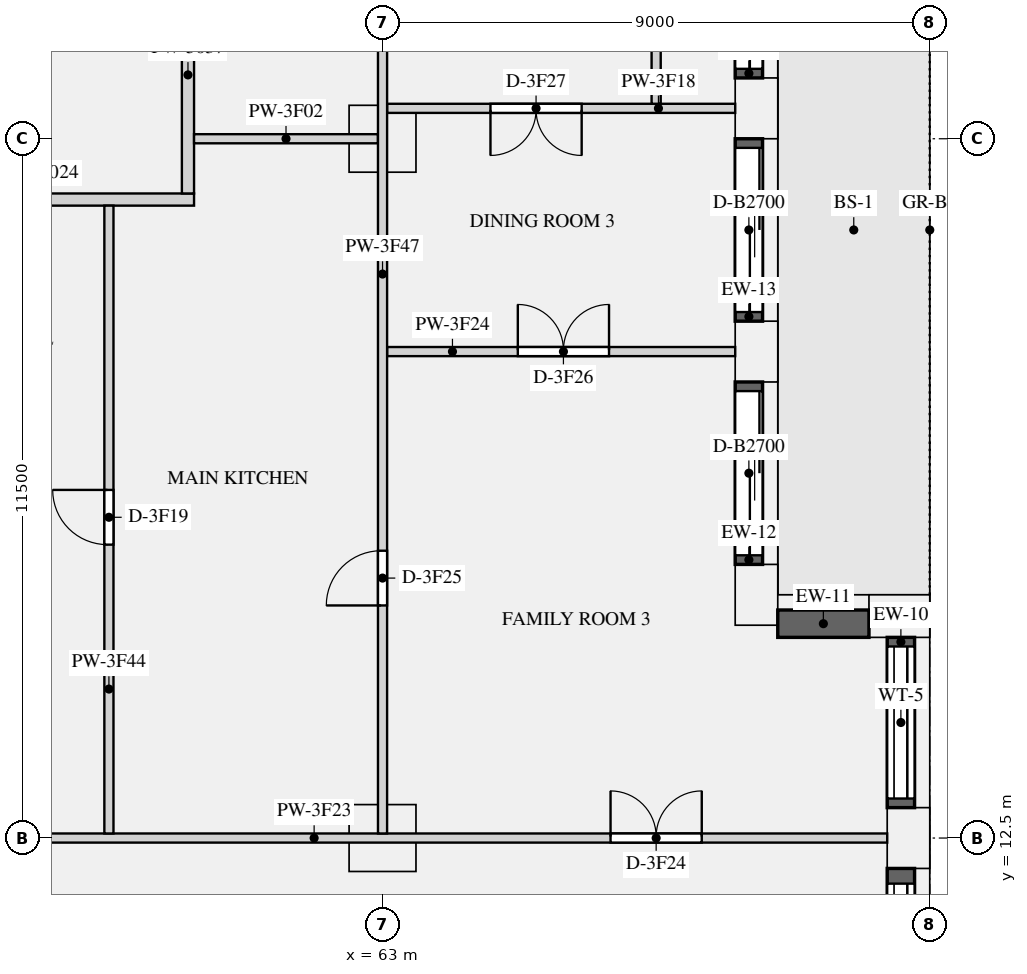
"""IFC4 building model, lengths in metres.
Left out: names, types, materials, properties, quantities, classifications, styles, units other than length and angle.
Written with IfcOpenShell. Run it as: python <this file> out.ifc"""

import sys

from ifc_helpers import new_model, si_unit, direction, frame, frame_2d, origin, origin_2d, place, context, subcontext, project, spatial, rectangle, extrude, element, fill, save


model = new_model("IFC4")
c1 = context("Model", 3, precision=1e-05, world=origin(), true_north=direction((0.0, 1.0)))
c2 = subcontext(c1, "Body", "Model", "MODEL_VIEW")
j1 = project(units=[si_unit("LENGTHUNIT", "METRE"), si_unit("PLANEANGLEUNIT", "RADIAN")], contexts=[c1])
p1 = place(None, origin())
s1 = spatial("IfcSite", under=j1, at=p1, CompositionType="ELEMENT")
p2 = place(p1, origin())
s2 = spatial("IfcBuilding", under=s1, at=p2, CompositionType="ELEMENT")
p3 = place(p2, frame((0.0, 0.0, 182.25)))
s3 = spatial("IfcBuildingStorey", under=s2, at=p3, CompositionType="ELEMENT", Elevation=182.25)
for number, where, z_axis, x_axis in (
    (1, (71.65, 12.5, 0.0), (0.0, 0.0, 1.0), (0.0, 1.0, 0.0)),
    (2, (71.5, 16.15, 0.0), (0.0, 0.0, 1.0), (-1.0, 0.0, 0.0)),
    (3, (69.15, 16.5, 0.0), (0.0, 0.0, 1.0), (0.0, 1.0, 0.0)),
    (4, (69.15, 20.5, 0.0), (0.0, 0.0, 1.0), (0.0, 1.0, 0.0)),
    (5, (69.15, 24.5, 0.0), (0.0, 0.0, 1.0), (0.0, 1.0, 0.0)),
):
    element("IfcColumn", number, at=place(p3, frame(where, z_axis=z_axis, x_axis=x_axis)), inside=s3, PredefinedType="USERDEFINED", context=c2, shape_type="SweptSolid", body=[
        extrude(rectangle(XDim=1.0, YDim=0.7, at=origin_2d()), origin(), (0.0, 0.0, 1.0), 3.15),
    ])
for number, where, z_axis, x_axis in (
    (6, (63.0, 24.0, 0.0), (0.0, 0.0, 1.0), (1.0, 0.0, 0.0)),
    (7, (63.0, 12.5, 0.0), (0.0, 0.0, 1.0), (1.0, 0.0, 0.0)),
):
    element("IfcColumn", number, at=place(p3, frame(where, z_axis=z_axis, x_axis=x_axis)), inside=s3, PredefinedType="COLUMN", context=c2, shape_type="SweptSolid", body=[
        extrude(rectangle(XDim=1.1, YDim=1.1, at=origin_2d()), origin(), (0.0, 0.0, 1.0), 3.15),
    ])
p4 = place(p3, frame((71.525, 9.0, 0.9), z_axis=(0.0, 0.0, 1.0), x_axis=(0.0, 1.0, 0.0)))
e8 = element("IfcWall", 8, at=p4, inside=s3, PredefinedType="SOLIDWALL", context=c2, shape_type="SweptSolid", body=[
    extrude(rectangle(XDim=3.0, YDim=0.45, at=frame_2d((1.5, 0.0))), origin(), (0.0, 0.0, 1.0), 1.75),
])
p5 = place(p4, frame((0.25, 0.0, 0.15)))
e9 = element("IfcOpeningElement", 9, at=p5, cuts=e8, PredefinedType="OPENING", context=c2, shape_type="SweptSolid", body=[
    extrude(rectangle(XDim=2.5, YDim=1.5, at=frame_2d((1.25, 0.75))), frame((0.0, 0.235, 0.0), z_axis=(0.0, -1.0, 0.0), x_axis=(1.0, 0.0, 0.0)), (0.0, 0.0, 1.0), 0.47),
])
p6 = place(p3, frame((71.525, 13.0, 0.9), z_axis=(0.0, 0.0, 1.0), x_axis=(0.0, 1.0, 0.0)))
e10 = element("IfcWall", 10, at=p6, inside=s3, PredefinedType="SOLIDWALL", context=c2, shape_type="SweptSolid", body=[
    extrude(rectangle(XDim=2.8, YDim=0.45, at=frame_2d((1.4, 0.0))), origin(), (0.0, 0.0, 1.0), 1.75),
])
p7 = place(p6, frame((0.15, 0.0, 0.15)))
e11 = element("IfcOpeningElement", 11, at=p7, cuts=e10, PredefinedType="OPENING", context=c2, shape_type="SweptSolid", body=[
    extrude(rectangle(XDim=2.5, YDim=1.5, at=frame_2d((1.25, 0.75))), frame((0.0, 0.235, 0.0), z_axis=(0.0, -1.0, 0.0), x_axis=(1.0, 0.0, 0.0)), (0.0, 0.0, 1.0), 0.47),
])
p8 = place(p3, frame((71.0, 16.025, 0.9), z_axis=(0.0, 0.0, 1.0), x_axis=(-1.0, 0.0, 0.0)))
e12 = element("IfcWall", 12, at=p8, inside=s3, PredefinedType="SOLIDWALL", context=c2, shape_type="SweptSolid", body=[
    extrude(rectangle(XDim=1.5, YDim=0.45, at=frame_2d((0.75, 0.0))), origin(), (0.0, 0.0, 1.0), 1.75),
])
p9 = place(p3, frame((69.025, 17.0, 0.0), z_axis=(0.0, 0.0, 1.0), x_axis=(0.0, 1.0, 0.0)))
e13 = element("IfcWall", 13, at=p9, inside=s3, PredefinedType="SOLIDWALL", context=c2, shape_type="SweptSolid", body=[
    extrude(rectangle(XDim=3.0, YDim=0.45, at=frame_2d((1.5, 0.0))), origin(), (0.0, 0.0, 1.0), 2.65),
])
p10 = place(p9, frame((0.15, 0.0, 0.0)))
e14 = element("IfcOpeningElement", 14, at=p10, cuts=e13, PredefinedType="OPENING", context=c2, shape_type="SweptSolid", body=[
    extrude(rectangle(XDim=2.7, YDim=2.3, at=frame_2d((1.35, 1.15))), frame((0.0, 0.235, 0.0), z_axis=(0.0, -1.0, 0.0), x_axis=(1.0, 0.0, 0.0)), (0.0, 0.0, 1.0), 0.47),
])
p11 = place(p3, frame((69.025, 21.0, 0.0), z_axis=(0.0, 0.0, 1.0), x_axis=(0.0, 1.0, 0.0)))
e15 = element("IfcWall", 15, at=p11, inside=s3, PredefinedType="SOLIDWALL", context=c2, shape_type="SweptSolid", body=[
    extrude(rectangle(XDim=3.0, YDim=0.45, at=frame_2d((1.5, 0.0))), origin(), (0.0, 0.0, 1.0), 2.65),
])
p12 = place(p11, frame((0.15, 0.0, 0.0)))
e16 = element("IfcOpeningElement", 16, at=p12, cuts=e15, PredefinedType="OPENING", context=c2, shape_type="SweptSolid", body=[
    extrude(rectangle(XDim=2.7, YDim=2.3, at=frame_2d((1.35, 1.15))), frame((0.0, 0.235, 0.0), z_axis=(0.0, -1.0, 0.0), x_axis=(1.0, 0.0, 0.0)), (0.0, 0.0, 1.0), 0.47),
])
p13 = place(p3, frame((69.025, 25.0, 0.0), z_axis=(0.0, 0.0, 1.0), x_axis=(0.0, 1.0, 0.0)))
e17 = element("IfcWall", 17, at=p13, inside=s3, PredefinedType="SOLIDWALL", context=c2, shape_type="SweptSolid", body=[
    extrude(rectangle(XDim=3.5, YDim=0.45, at=frame_2d((1.75, 0.0))), origin(), (0.0, 0.0, 1.0), 2.65),
])
p14 = place(p13, frame((0.15, 0.0, 0.0)))
e18 = element("IfcOpeningElement", 18, at=p14, cuts=e17, PredefinedType="OPENING", context=c2, shape_type="SweptSolid", body=[
    extrude(rectangle(XDim=3.2, YDim=2.3, at=frame_2d((1.6, 1.15))), frame((0.0, 0.235, 0.0), z_axis=(0.0, -1.0, 0.0), x_axis=(1.0, 0.0, 0.0)), (0.0, 0.0, 1.0), 0.47),
])
p15 = place(p3, frame((54.9, 23.0, 0.0), z_axis=(0.0, 0.0, 1.0), x_axis=(1.0, 0.0, 0.0)))
e19 = element("IfcWall", 19, at=p15, inside=s3, PredefinedType="PARTITIONING", context=c2, shape_type="SweptSolid", body=[
    extrude(rectangle(XDim=5.0, YDim=0.2, at=frame_2d((2.5, 0.0))), origin(), (0.0, 0.0, 1.0), 2.65),
])
p16 = place(p3, frame((59.8, 23.1, 0.0), z_axis=(0.0, 0.0, 1.0), x_axis=(0.0, 1.0, 0.0)))
e20 = element("IfcWall", 20, at=p16, inside=s3, PredefinedType="PARTITIONING", context=c2, shape_type="SweptSolid", body=[
    extrude(rectangle(XDim=3.9, YDim=0.2, at=frame_2d((1.95, 0.0))), origin(), (0.0, 0.0, 1.0), 2.65),
])
p17 = place(p3, frame((59.9, 24.0, 0.0), z_axis=(0.0, 0.0, 1.0), x_axis=(1.0, 0.0, 0.0)))
e21 = element("IfcWall", 21, at=p17, inside=s3, PredefinedType="PARTITIONING", context=c2, shape_type="SweptSolid", body=[
    extrude(rectangle(XDim=3.025, YDim=0.15, at=frame_2d((1.513, 0.0))), origin(), (0.0, 0.0, 1.0), 2.65),
])
p18 = place(p3, frame((63.075, 24.5, 0.0), z_axis=(0.0, 0.0, 1.0), x_axis=(1.0, 0.0, 0.0)))
e22 = element("IfcWall", 22, at=p18, inside=s3, PredefinedType="PARTITIONING", context=c2, shape_type="SweptSolid", body=[
    extrude(rectangle(XDim=5.725, YDim=0.15, at=frame_2d((2.863, 0.0))), origin(), (0.0, 0.0, 1.0), 2.65),
])
p19 = place(p18, frame((1.7, 0.0, 0.0)))
e23 = element("IfcOpeningElement", 23, at=p19, cuts=e22, PredefinedType="OPENING", context=c2, shape_type="SweptSolid", body=[
    extrude(rectangle(XDim=1.5, YDim=2.1, at=frame_2d((0.75, 1.05))), frame((0.0, 0.085, 0.0), z_axis=(0.0, -1.0, 0.0), x_axis=(1.0, 0.0, 0.0)), (0.0, 0.0, 1.0), 0.17),
])
p20 = place(p3, frame((54.0, 12.5, 0.0), z_axis=(0.0, 0.0, 1.0), x_axis=(1.0, 0.0, 0.0)))
e24 = element("IfcWall", 24, at=p20, inside=s3, PredefinedType="PARTITIONING", context=c2, shape_type="SweptSolid", body=[
    extrude(rectangle(XDim=17.3, YDim=0.15, at=frame_2d((8.65, 0.0))), origin(), (0.0, 0.0, 1.0), 2.65),
])
p21 = place(p20, frame((1.5, 0.0, 0.0)))
e25 = element("IfcOpeningElement", 25, at=p21, cuts=e24, PredefinedType="OPENING", context=c2, shape_type="SweptSolid", body=[
    extrude(rectangle(XDim=1.5, YDim=2.1, at=frame_2d((0.75, 1.05))), frame((0.0, 0.085, 0.0), z_axis=(0.0, -1.0, 0.0), x_axis=(1.0, 0.0, 0.0)), (0.0, 0.0, 1.0), 0.17),
])
p22 = place(p20, frame((12.75, 0.0, 0.0)))
e26 = element("IfcOpeningElement", 26, at=p22, cuts=e24, PredefinedType="OPENING", context=c2, shape_type="SweptSolid", body=[
    extrude(rectangle(XDim=1.5, YDim=2.1, at=frame_2d((0.75, 1.05))), frame((0.0, 0.085, 0.0), z_axis=(0.0, -1.0, 0.0), x_axis=(1.0, 0.0, 0.0)), (0.0, 0.0, 1.0), 0.17),
])
p23 = place(p3, frame((63.075, 20.5, 0.0), z_axis=(0.0, 0.0, 1.0), x_axis=(1.0, 0.0, 0.0)))
e27 = element("IfcWall", 27, at=p23, inside=s3, PredefinedType="PARTITIONING", context=c2, shape_type="SweptSolid", body=[
    extrude(rectangle(XDim=5.725, YDim=0.15, at=frame_2d((2.863, 0.0))), origin(), (0.0, 0.0, 1.0), 2.65),
])
p24 = place(p23, frame((2.15, 0.0, 0.0)))
e28 = element("IfcOpeningElement", 28, at=p24, cuts=e27, PredefinedType="OPENING", context=c2, shape_type="SweptSolid", body=[
    extrude(rectangle(XDim=1.5, YDim=2.1, at=frame_2d((0.75, 1.05))), frame((0.0, 0.085, 0.0), z_axis=(0.0, -1.0, 0.0), x_axis=(1.0, 0.0, 0.0)), (0.0, 0.0, 1.0), 0.17),
])
p25 = place(p3, frame((58.5, 12.575, 0.0), z_axis=(0.0, 0.0, 1.0), x_axis=(0.0, 1.0, 0.0)))
e29 = element("IfcWall", 29, at=p25, inside=s3, PredefinedType="PARTITIONING", context=c2, shape_type="SweptSolid", body=[
    extrude(rectangle(XDim=10.325, YDim=0.15, at=frame_2d((5.163, 0.0))), origin(), (0.0, 0.0, 1.0), 2.65),
])
p26 = place(p25, frame((4.75, 0.0, 0.0)))
e30 = element("IfcOpeningElement", 30, at=p26, cuts=e29, PredefinedType="OPENING", context=c2, shape_type="SweptSolid", body=[
    extrude(rectangle(XDim=0.9, YDim=2.1, at=frame_2d((0.45, 1.05))), frame((0.0, 0.085, 0.0), z_axis=(0.0, -1.0, 0.0), x_axis=(1.0, 0.0, 0.0)), (0.0, 0.0, 1.0), 0.17),
])
p27 = place(p3, frame((63.0, 12.575, 0.0), z_axis=(0.0, 0.0, 1.0), x_axis=(0.0, 1.0, 0.0)))
e31 = element("IfcWall", 31, at=p27, inside=s3, PredefinedType="PARTITIONING", context=c2, shape_type="SweptSolid", body=[
    extrude(rectangle(XDim=16.35, YDim=0.15, at=frame_2d((8.175, 0.0))), origin(), (0.0, 0.0, 1.0), 2.65),
])
p28 = place(p27, frame((3.75, 0.0, 0.0)))
e32 = element("IfcOpeningElement", 32, at=p28, cuts=e31, PredefinedType="OPENING", context=c2, shape_type="SweptSolid", body=[
    extrude(rectangle(XDim=0.9, YDim=2.1, at=frame_2d((0.45, 1.05))), frame((0.0, 0.085, 0.0), z_axis=(0.0, -1.0, 0.0), x_axis=(1.0, 0.0, 0.0)), (0.0, 0.0, 1.0), 0.17),
])
p29 = place(p27, frame((13.75, 0.0, 0.0)))
e33 = element("IfcOpeningElement", 33, at=p29, cuts=e31, PredefinedType="OPENING", context=c2, shape_type="SweptSolid", body=[
    extrude(rectangle(XDim=0.9, YDim=2.1, at=frame_2d((0.45, 1.05))), frame((0.0, 0.085, 0.0), z_axis=(0.0, -1.0, 0.0), x_axis=(1.0, 0.0, 0.0)), (0.0, 0.0, 1.0), 0.17),
])
p30 = place(p3, frame((67.5, 24.575, 0.0), z_axis=(0.0, 0.0, 1.0), x_axis=(0.0, 1.0, 0.0)))
e34 = element("IfcWall", 34, at=p30, inside=s3, PredefinedType="PARTITIONING", context=c2, shape_type="SweptSolid", body=[
    extrude(rectangle(XDim=10.75, YDim=0.15, at=frame_2d((5.375, 0.0))), origin(), (0.0, 0.0, 1.0), 2.65),
])
p31 = place(p30, frame((6.875, 0.0, 0.0)))
e35 = element("IfcOpeningElement", 35, at=p31, cuts=e34, PredefinedType="OPENING", context=c2, shape_type="SweptSolid", body=[
    extrude(rectangle(XDim=1.5, YDim=2.1, at=frame_2d((0.75, 1.05))), frame((0.0, 0.085, 0.0), z_axis=(0.0, -1.0, 0.0), x_axis=(1.0, 0.0, 0.0)), (0.0, 0.0, 1.0), 0.17),
])
p32 = place(p5, origin())
e36 = element("IfcWindow", 36, at=p32, inside=s3, PartitioningType="SINGLE_PANEL", PredefinedType="WINDOW", context=c2, shape_type="SweptSolid", body=[
    extrude(rectangle(XDim=2.5, YDim=1.5, at=frame_2d((1.25, 0.75))), frame((0.0, -0.065, 0.0), z_axis=(0.0, -1.0, 0.0), x_axis=(1.0, 0.0, 0.0)), (0.0, 0.0, 1.0), 0.06),
])
fill(e9, e36)
p33 = place(p7, origin())
e37 = element("IfcWindow", 37, at=p33, inside=s3, PartitioningType="SINGLE_PANEL", PredefinedType="WINDOW", context=c2, shape_type="SweptSolid", body=[
    extrude(rectangle(XDim=2.5, YDim=1.5, at=frame_2d((1.25, 0.75))), frame((0.0, -0.065, 0.0), z_axis=(0.0, -1.0, 0.0), x_axis=(1.0, 0.0, 0.0)), (0.0, 0.0, 1.0), 0.06),
])
fill(e11, e37)
p34 = place(p10, origin())
e38 = element("IfcDoor", 38, at=p34, inside=s3, OperationType="SLIDING_TO_LEFT", PredefinedType="DOOR", context=c2, shape_type="SweptSolid", body=[
    extrude(rectangle(XDim=2.7, YDim=2.3, at=frame_2d((1.35, 1.15))), frame((0.0, -0.07, 0.0), z_axis=(0.0, -1.0, 0.0), x_axis=(1.0, 0.0, 0.0)), (0.0, 0.0, 1.0), 0.05),
])
fill(e14, e38)
p35 = place(p12, origin())
e39 = element("IfcDoor", 39, at=p35, inside=s3, OperationType="SLIDING_TO_LEFT", PredefinedType="DOOR", context=c2, shape_type="SweptSolid", body=[
    extrude(rectangle(XDim=2.7, YDim=2.3, at=frame_2d((1.35, 1.15))), frame((0.0, -0.07, 0.0), z_axis=(0.0, -1.0, 0.0), x_axis=(1.0, 0.0, 0.0)), (0.0, 0.0, 1.0), 0.05),
])
fill(e16, e39)
p36 = place(p14, origin())
e40 = element("IfcDoor", 40, at=p36, inside=s3, OperationType="SLIDING_TO_LEFT", PredefinedType="DOOR", context=c2, shape_type="SweptSolid", body=[
    extrude(rectangle(XDim=3.2, YDim=2.3, at=frame_2d((1.6, 1.15))), frame((0.0, -0.07, 0.0), z_axis=(0.0, -1.0, 0.0), x_axis=(1.0, 0.0, 0.0)), (0.0, 0.0, 1.0), 0.05),
])
fill(e18, e40)
p37 = place(p26, origin())
e41 = element("IfcDoor", 41, at=p37, inside=s3, OperationType="SINGLE_SWING_RIGHT", PredefinedType="DOOR", context=c2, shape_type="SweptSolid", body=[
    extrude(rectangle(XDim=0.9, YDim=2.1, at=frame_2d((0.45, 1.05))), frame((0.0, 0.025, 0.0), z_axis=(0.0, -1.0, 0.0), x_axis=(1.0, 0.0, 0.0)), (0.0, 0.0, 1.0), 0.05),
])
fill(e30, e41)
p38 = place(p22, origin())
e42 = element("IfcDoor", 42, at=p38, inside=s3, OperationType="DOUBLE_DOOR_SINGLE_SWING", PredefinedType="DOOR", context=c2, shape_type="SweptSolid", body=[
    extrude(rectangle(XDim=1.5, YDim=2.1, at=frame_2d((0.75, 1.05))), frame((0.0, 0.025, 0.0), z_axis=(0.0, -1.0, 0.0), x_axis=(1.0, 0.0, 0.0)), (0.0, 0.0, 1.0), 0.05),
])
fill(e26, e42)
p39 = place(p28, origin())
e43 = element("IfcDoor", 43, at=p39, inside=s3, OperationType="SINGLE_SWING_LEFT", PredefinedType="DOOR", context=c2, shape_type="SweptSolid", body=[
    extrude(rectangle(XDim=0.9, YDim=2.1, at=frame_2d((0.45, 1.05))), frame((0.0, 0.025, 0.0), z_axis=(0.0, -1.0, 0.0), x_axis=(1.0, 0.0, 0.0)), (0.0, 0.0, 1.0), 0.05),
])
fill(e32, e43)
p40 = place(p24, origin())
e44 = element("IfcDoor", 44, at=p40, inside=s3, OperationType="DOUBLE_DOOR_SINGLE_SWING", PredefinedType="DOOR", context=c2, shape_type="SweptSolid", body=[
    extrude(rectangle(XDim=1.5, YDim=2.1, at=frame_2d((0.75, 1.05))), frame((0.0, 0.025, 0.0), z_axis=(0.0, -1.0, 0.0), x_axis=(1.0, 0.0, 0.0)), (0.0, 0.0, 1.0), 0.05),
])
fill(e28, e44)
p41 = place(p19, frame((1.5, 0.0, 0.0), z_axis=(0.0, 0.0, 1.0), x_axis=(-1.0, 0.0, 0.0)))
e45 = element("IfcDoor", 45, at=p41, inside=s3, OperationType="DOUBLE_DOOR_SINGLE_SWING", PredefinedType="DOOR", context=c2, shape_type="SweptSolid", body=[
    extrude(rectangle(XDim=1.5, YDim=2.1, at=frame_2d((0.75, 1.05))), frame((0.0, 0.025, 0.0), z_axis=(0.0, -1.0, 0.0), x_axis=(1.0, 0.0, 0.0)), (0.0, 0.0, 1.0), 0.05),
])
fill(e23, e45)
save(model, sys.argv[1])
